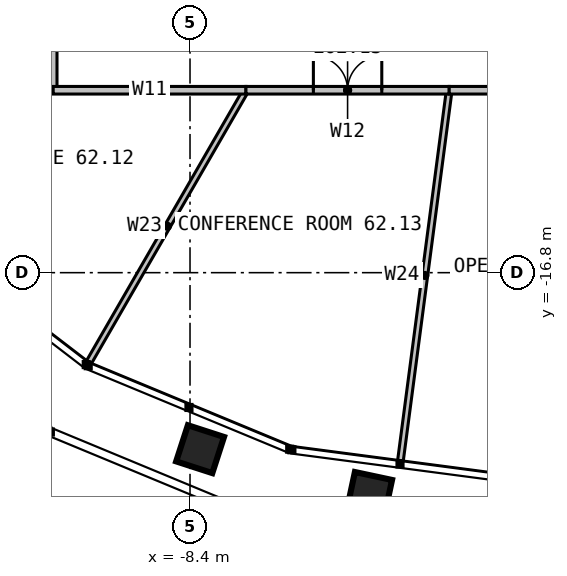
"""IFC4 building model, lengths in metres.
Left out: names, types, materials, properties, quantities, classifications, styles, units other than length and angle.
Written with IfcOpenShell. Run it as: python <this file> out.ifc"""

import sys

from ifc_helpers import new_model, si_unit, direction, frame, frame_2d, origin, place, context, subcontext, project, spatial, rectangle, extrude, element, fill, save


model = new_model("IFC4")
c1 = context("Model", 3, precision=1e-05, world=origin(), true_north=direction((0.0, 1.0)))
c2 = subcontext(c1, "Body", "Model", "MODEL_VIEW")
j1 = project(units=[si_unit("LENGTHUNIT", "METRE"), si_unit("PLANEANGLEUNIT", "RADIAN")], contexts=[c1])
p1 = place(None, origin())
s1 = spatial("IfcSite", under=j1, at=p1, CompositionType="ELEMENT")
p2 = place(p1, origin())
s2 = spatial("IfcBuilding", under=s1, at=p2, CompositionType="ELEMENT")
p3 = place(p2, frame((0.0, 0.0, 256.0)))
s3 = spatial("IfcBuildingStorey", under=s2, at=p3, CompositionType="ELEMENT", Elevation=256.0)
for number, where, z_axis, x_axis in (
    (1, (-12.0, -6.928, 0.0), (0.0, 0.0, 1.0), (-0.866, -0.5, 0.0)),
    (2, (-6.928, -12.0, 0.0), (0.0, 0.0, 1.0), (-0.5, -0.866, 0.0)),
):
    element("IfcWall", number, at=place(p3, frame(where, z_axis=z_axis, x_axis=x_axis)), inside=s3, PredefinedType="PARTITIONING", context=c2, shape_type="SweptSolid", body=[
        extrude(rectangle(XDim=8.266, YDim=0.15, at=frame_2d((4.133, 0.0))), origin(), (0.0, 0.0, 1.0), 2.79),
    ])
p4 = place(p3, frame((-1.58, -12.0, 0.0), z_axis=(0.0, 0.0, 1.0), x_axis=(-0.130521974705, -0.991445416611, 0.0)))
e3 = element("IfcWall", 3, at=p4, inside=s3, PredefinedType="PARTITIONING", context=c2, shape_type="SweptSolid", body=[
    extrude(rectangle(XDim=9.829, YDim=0.15, at=frame_2d((4.915, 0.0))), origin(), (0.0, 0.0, 1.0), 2.79),
])
p5 = place(p3, frame((-12.0, -6.928, 0.0), z_axis=(0.0, 0.0, 1.0), x_axis=(0.0, -1.0, 0.0)))
e4 = element("IfcWall", 4, at=p5, inside=s3, PredefinedType="PARTITIONING", context=c2, shape_type="SweptSolid", body=[
    extrude(rectangle(XDim=5.072, YDim=0.2, at=frame_2d((2.536, 0.0))), origin(), (0.0, 0.0, 1.0), 3.8),
])
p6 = place(p5, frame((1.636, 0.0, 0.0)))
e5 = element("IfcOpeningElement", 5, at=p6, cuts=e4, PredefinedType="OPENING", context=c2, shape_type="SweptSolid", body=[
    extrude(rectangle(XDim=1.8, YDim=2.2, at=frame_2d((0.9, 1.1))), frame((0.0, 0.11, 0.0), z_axis=(0.0, -1.0, 0.0), x_axis=(1.0, 0.0, 0.0)), (0.0, 0.0, 1.0), 0.22),
])
p7 = place(p3, frame((-12.0, -12.0, 0.0), z_axis=(0.0, 0.0, 1.0), x_axis=(1.0, 0.0, 0.0)))
e6 = element("IfcWall", 6, at=p7, inside=s3, PredefinedType="PARTITIONING", context=c2, shape_type="SweptSolid", body=[
    extrude(rectangle(XDim=5.072, YDim=0.2, at=frame_2d((2.536, 0.0))), origin(), (0.0, 0.0, 1.0), 3.8),
])
p8 = place(p3, frame((-6.928, -12.0, 0.0), z_axis=(0.0, 0.0, 1.0), x_axis=(1.0, 0.0, 0.0)))
e7 = element("IfcWall", 7, at=p8, inside=s3, PredefinedType="PARTITIONING", context=c2, shape_type="SweptSolid", body=[
    extrude(rectangle(XDim=5.348, YDim=0.2, at=frame_2d((2.674, 0.0))), origin(), (0.0, 0.0, 1.0), 3.8),
])
p9 = place(p8, frame((1.774, 0.0, 0.0)))
e8 = element("IfcOpeningElement", 8, at=p9, cuts=e7, PredefinedType="OPENING", context=c2, shape_type="SweptSolid", body=[
    extrude(rectangle(XDim=1.8, YDim=2.2, at=frame_2d((0.9, 1.1))), frame((0.0, 0.11, 0.0), z_axis=(0.0, -1.0, 0.0), x_axis=(1.0, 0.0, 0.0)), (0.0, 0.0, 1.0), 0.22),
])
p10 = place(p3, frame((-1.58, -12.0, 0.0), z_axis=(0.0, 0.0, 1.0), x_axis=(1.0, 0.0, 0.0)))
e9 = element("IfcWall", 9, at=p10, inside=s3, PredefinedType="PARTITIONING", context=c2, shape_type="SweptSolid", body=[
    extrude(rectangle(XDim=4.795, YDim=0.2, at=frame_2d((2.397, 0.0))), origin(), (0.0, 0.0, 1.0), 3.8),
])
p11 = place(p10, frame((1.498, 0.0, 0.0)))
e10 = element("IfcOpeningElement", 10, at=p11, cuts=e9, PredefinedType="OPENING", context=c2, shape_type="SweptSolid", body=[
    extrude(rectangle(XDim=1.8, YDim=2.2, at=frame_2d((0.9, 1.1))), frame((0.0, 0.11, 0.0), z_axis=(0.0, -1.0, 0.0), x_axis=(1.0, 0.0, 0.0)), (0.0, 0.0, 1.0), 0.22),
])
p12 = place(p9, origin())
e11 = element("IfcDoor", 11, at=p12, inside=s3, OperationType="DOUBLE_DOOR_SINGLE_SWING", PredefinedType="DOOR", context=c2, shape_type="SweptSolid", body=[
    extrude(rectangle(XDim=1.8, YDim=2.2, at=frame_2d((0.9, 1.1))), frame((0.0, 0.025, 0.0), z_axis=(0.0, -1.0, 0.0), x_axis=(1.0, 0.0, 0.0)), (0.0, 0.0, 1.0), 0.05),
])
fill(e8, e11)
save(model, sys.argv[1])
